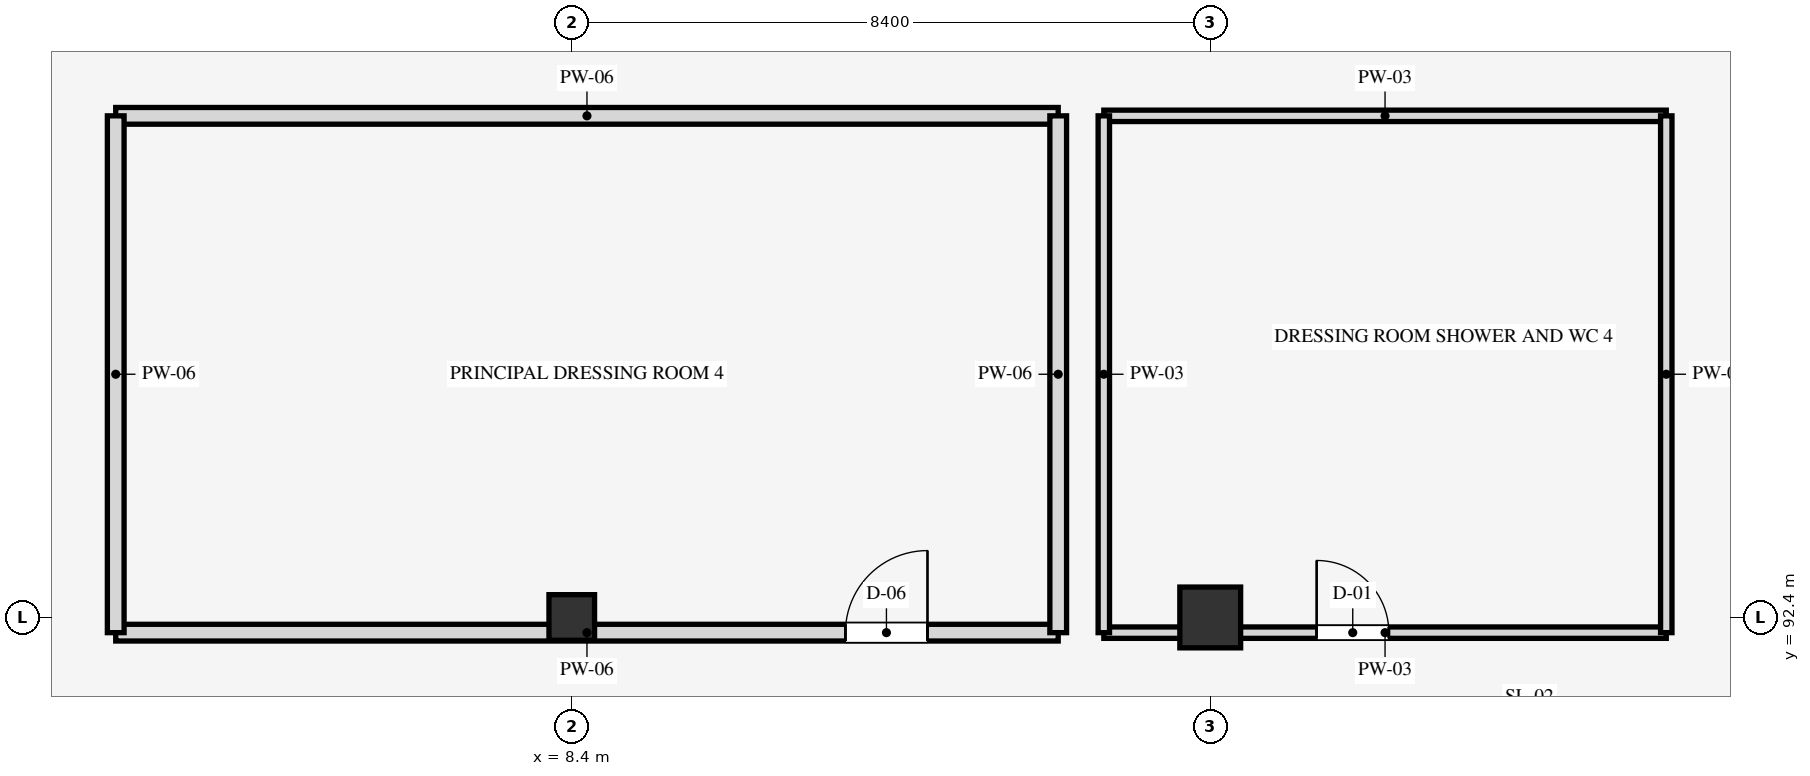
"""IFC4 building model, lengths in metres.
Left out: names, types, materials, properties, quantities, classifications, styles, units other than length and angle.
Written with IfcOpenShell. Run it as: python <this file> out.ifc"""

import sys

from ifc_helpers import new_model, si_unit, direction, frame, frame_2d, origin, origin_2d, place, context, subcontext, project, spatial, rectangle, extrude, element, fill, save


model = new_model("IFC4")
c1 = context("Model", 3, precision=1e-05, world=origin(), true_north=direction((0.0, 1.0)))
c2 = subcontext(c1, "Body", "Model", "MODEL_VIEW")
j1 = project(units=[si_unit("LENGTHUNIT", "METRE"), si_unit("PLANEANGLEUNIT", "RADIAN")], contexts=[c1])
p1 = place(None, origin())
s1 = spatial("IfcSite", under=j1, at=p1, CompositionType="ELEMENT")
p2 = place(p1, origin())
s2 = spatial("IfcBuilding", under=s1, at=p2, CompositionType="ELEMENT")
p3 = place(p2, frame((0.0, 0.0, 5.4)))
s3 = spatial("IfcBuildingStorey", under=s2, at=p3, CompositionType="ELEMENT", Elevation=5.4)
p4 = place(p3, frame((8.4, 92.4, 0.0), z_axis=(0.0, 0.0, 1.0), x_axis=(1.0, 0.0, 0.0)))
e1 = element("IfcColumn", 1, at=p4, inside=s3, PredefinedType="COLUMN", context=c2, shape_type="SweptSolid", body=[
    extrude(rectangle(XDim=0.6, YDim=0.6, at=origin_2d()), origin(), (0.0, 0.0, 1.0), 4.5),
])
p5 = place(p3, frame((16.8, 92.4, 0.0), z_axis=(0.0, 0.0, 1.0), x_axis=(1.0, 0.0, 0.0)))
e2 = element("IfcColumn", 2, at=p5, inside=s3, PredefinedType="COLUMN", context=c2, shape_type="SweptSolid", body=[
    extrude(rectangle(XDim=0.8, YDim=0.8, at=origin_2d()), origin(), (0.0, 0.0, 1.0), 4.5),
])
p6 = place(p3, frame((2.4, 92.2, 0.0), z_axis=(0.0, 0.0, 1.0), x_axis=(1.0, 0.0, 0.0)))
e3 = element("IfcWall", 3, at=p6, inside=s3, PredefinedType="PARTITIONING", context=c2, shape_type="SweptSolid", body=[
    extrude(rectangle(XDim=12.4, YDim=0.22, at=frame_2d((6.2, 0.0))), origin(), (0.0, 0.0, 1.0), 3.54),
])
p7 = place(p6, frame((9.6, 0.0, 0.0)))
e4 = element("IfcOpeningElement", 4, at=p7, cuts=e3, PredefinedType="OPENING", context=c2, shape_type="SweptSolid", body=[
    extrude(rectangle(XDim=1.08, YDim=2.12, at=frame_2d((0.54, 1.06))), frame((0.0, 0.12, 0.0), z_axis=(0.0, -1.0, 0.0), x_axis=(1.0, 0.0, 0.0)), (0.0, 0.0, 1.0), 0.24),
])
p8 = place(p3, frame((2.4, 99.0, 0.0), z_axis=(0.0, 0.0, 1.0), x_axis=(1.0, 0.0, 0.0)))
e5 = element("IfcWall", 5, at=p8, inside=s3, PredefinedType="PARTITIONING", context=c2, shape_type="SweptSolid", body=[
    extrude(rectangle(XDim=12.4, YDim=0.22, at=frame_2d((6.2, 0.0))), origin(), (0.0, 0.0, 1.0), 3.54),
])
for number, where, z_axis, x_axis in (
    (6, (2.4, 92.2, 0.0), (0.0, 0.0, 1.0), (0.0, 1.0, 0.0)),
    (7, (14.8, 92.2, 0.0), (0.0, 0.0, 1.0), (0.0, 1.0, 0.0)),
):
    element("IfcWall", number, at=place(p3, frame(where, z_axis=z_axis, x_axis=x_axis)), inside=s3, PredefinedType="PARTITIONING", context=c2, shape_type="SweptSolid", body=[
        extrude(rectangle(XDim=6.8, YDim=0.22, at=frame_2d((3.4, 0.0))), origin(), (0.0, 0.0, 1.0), 3.54),
    ])
p9 = place(p3, frame((15.4, 92.2, 0.0), z_axis=(0.0, 0.0, 1.0), x_axis=(1.0, 0.0, 0.0)))
e8 = element("IfcWall", 8, at=p9, inside=s3, PredefinedType="PARTITIONING", context=c2, shape_type="SweptSolid", body=[
    extrude(rectangle(XDim=7.4, YDim=0.15, at=frame_2d((3.7, 0.0))), origin(), (0.0, 0.0, 1.0), 3.54),
])
p10 = place(p9, frame((2.8, 0.0, 0.0)))
e9 = element("IfcOpeningElement", 9, at=p10, cuts=e8, PredefinedType="OPENING", context=c2, shape_type="SweptSolid", body=[
    extrude(rectangle(XDim=0.95, YDim=2.1, at=frame_2d((0.475, 1.05))), frame((0.0, 0.085, 0.0), z_axis=(0.0, -1.0, 0.0), x_axis=(1.0, 0.0, 0.0)), (0.0, 0.0, 1.0), 0.17),
])
p11 = place(p3, frame((15.4, 99.0, 0.0), z_axis=(0.0, 0.0, 1.0), x_axis=(1.0, 0.0, 0.0)))
e10 = element("IfcWall", 10, at=p11, inside=s3, PredefinedType="PARTITIONING", context=c2, shape_type="SweptSolid", body=[
    extrude(rectangle(XDim=7.4, YDim=0.15, at=frame_2d((3.7, 0.0))), origin(), (0.0, 0.0, 1.0), 3.54),
])
for number, where, z_axis, x_axis in (
    (11, (15.4, 92.2, 0.0), (0.0, 0.0, 1.0), (0.0, 1.0, 0.0)),
    (12, (22.8, 92.2, 0.0), (0.0, 0.0, 1.0), (0.0, 1.0, 0.0)),
):
    element("IfcWall", number, at=place(p3, frame(where, z_axis=z_axis, x_axis=x_axis)), inside=s3, PredefinedType="PARTITIONING", context=c2, shape_type="SweptSolid", body=[
        extrude(rectangle(XDim=6.8, YDim=0.15, at=frame_2d((3.4, 0.0))), origin(), (0.0, 0.0, 1.0), 3.54),
    ])
p12 = place(p7, origin())
e13 = element("IfcDoor", 13, at=p12, inside=s3, OperationType="SINGLE_SWING_RIGHT", PredefinedType="DOOR", context=c2, shape_type="SweptSolid", body=[
    extrude(rectangle(XDim=1.08, YDim=2.12, at=frame_2d((0.54, 1.06))), frame((0.0, 0.025, 0.0), z_axis=(0.0, -1.0, 0.0), x_axis=(1.0, 0.0, 0.0)), (0.0, 0.0, 1.0), 0.05),
])
fill(e4, e13)
p13 = place(p10, origin())
e14 = element("IfcDoor", 14, at=p13, inside=s3, OperationType="SINGLE_SWING_LEFT", PredefinedType="DOOR", context=c2, shape_type="SweptSolid", body=[
    extrude(rectangle(XDim=0.95, YDim=2.1, at=frame_2d((0.475, 1.05))), frame((0.0, 0.025, 0.0), z_axis=(0.0, -1.0, 0.0), x_axis=(1.0, 0.0, 0.0)), (0.0, 0.0, 1.0), 0.05),
])
fill(e9, e14)
save(model, sys.argv[1])
